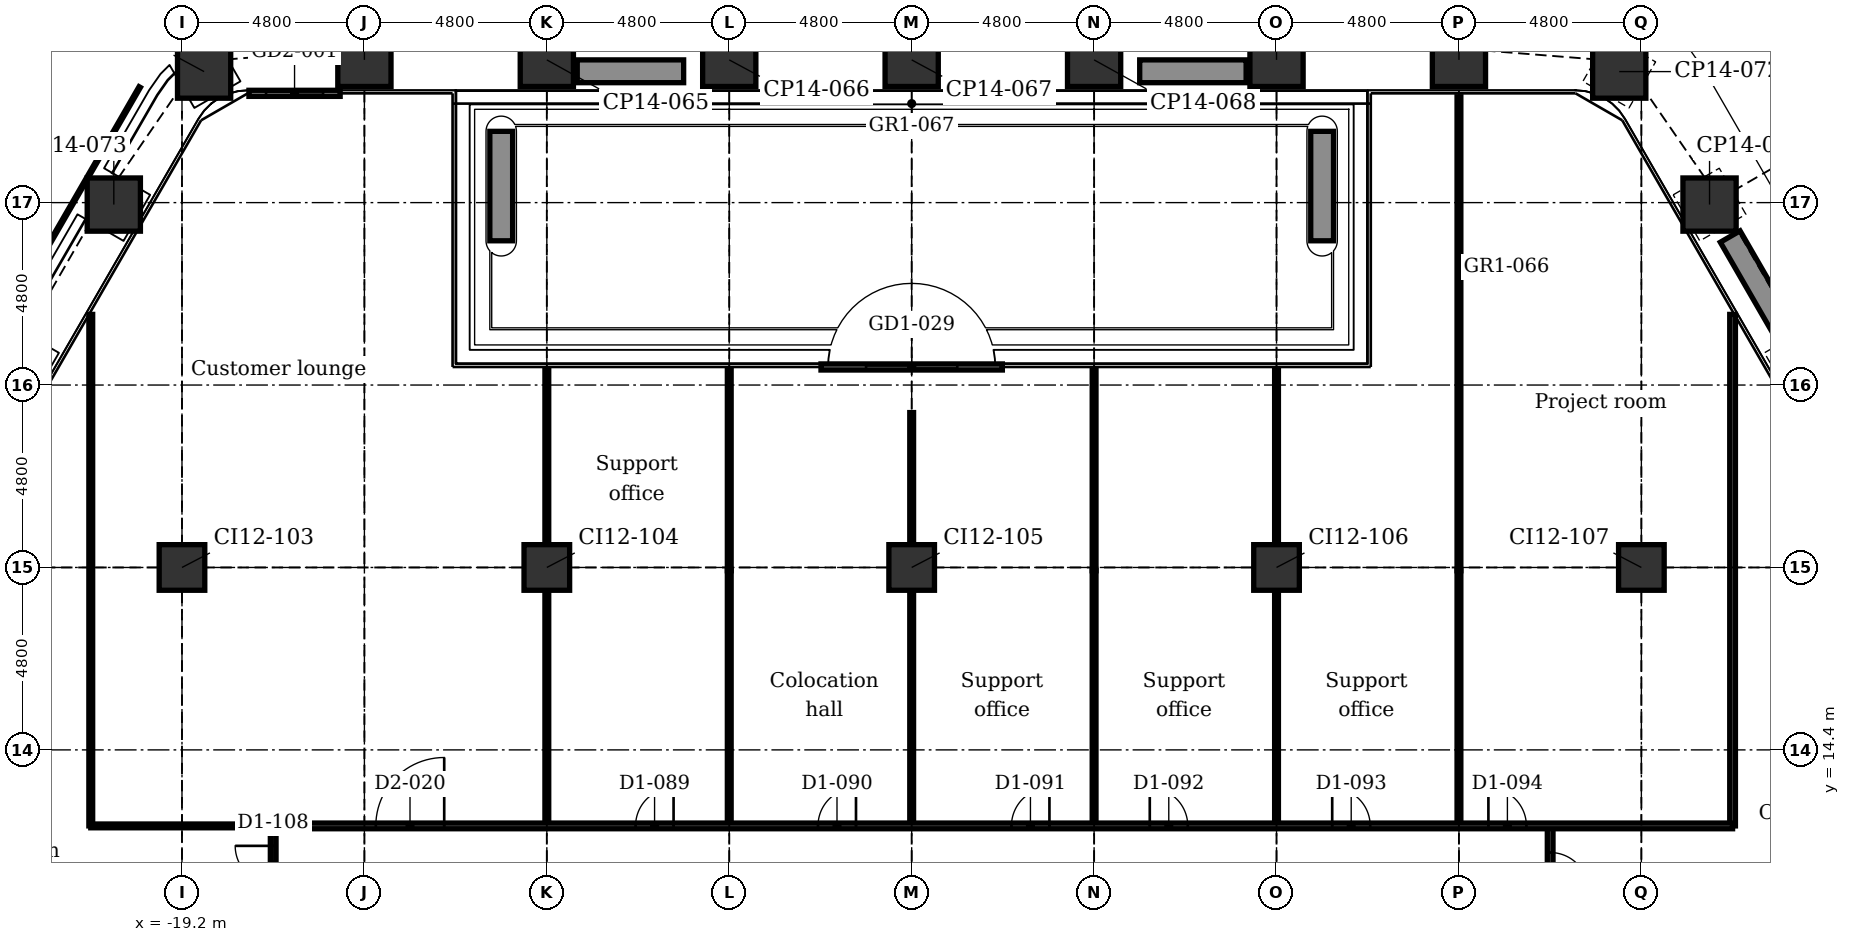
"""IFC4 building model, lengths in metres.
Left out: names, types, materials, properties, quantities, classifications, styles, units other than length and angle.
Written with IfcOpenShell. Run it as: python <this file> out.ifc"""

import sys

from ifc_helpers import new_model, si_unit, direction, frame, frame_2d, origin, origin_2d, place, context, subcontext, project, spatial, rectangle, extrude, element, fill, save


model = new_model("IFC4")
c1 = context("Model", 3, precision=1e-05, world=origin(), true_north=direction((0.0, 1.0)))
c2 = subcontext(c1, "Body", "Model", "MODEL_VIEW")
j1 = project(units=[si_unit("LENGTHUNIT", "METRE"), si_unit("PLANEANGLEUNIT", "RADIAN")], contexts=[c1])
p1 = place(None, origin())
s1 = spatial("IfcSite", under=j1, at=p1, CompositionType="ELEMENT")
p2 = place(p1, origin())
s2 = spatial("IfcBuilding", under=s1, at=p2, CompositionType="ELEMENT")
p3 = place(p2, frame((0.0, 0.0, 38.9)))
s3 = spatial("IfcBuildingStorey", under=s2, at=p3, CompositionType="ELEMENT", Elevation=38.9)
for number, where, z_axis, x_axis in (
    (1, (-18.618, 32.247, -0.25), (0.0, 0.0, 1.0), (0.866, 0.5, 0.0)),
    (2, (-14.4, 32.555, -0.25), (0.0, 0.0, 1.0), (1.0, 0.0, 0.0)),
    (3, (-9.6, 32.555, -0.25), (0.0, 0.0, 1.0), (1.0, 0.0, 0.0)),
    (4, (-4.8, 32.555, -0.25), (0.0, 0.0, 1.0), (1.0, 0.0, 0.0)),
    (5, (0.0, 32.555, -0.25), (0.0, 0.0, 1.0), (1.0, 0.0, 0.0)),
    (6, (4.8, 32.555, -0.25), (0.0, 0.0, 1.0), (1.0, 0.0, 0.0)),
    (7, (9.6, 32.555, -0.25), (0.0, 0.0, 1.0), (1.0, 0.0, 0.0)),
    (8, (14.4, 32.555, -0.25), (0.0, 0.0, 1.0), (1.0, 0.0, 0.0)),
    (9, (18.618, 32.247, -0.25), (0.0, 0.0, 1.0), (0.5, 0.866, 0.0)),
    (10, (20.994, 28.749, -0.25), (0.0, 0.0, 1.0), (0.866, 0.5, 0.0)),
    (11, (23.394, 24.592, -0.25), (0.0, 0.0, 1.0), (0.866, 0.5, 0.0)),
    (12, (-23.394, 24.592, -0.25), (0.0, 0.0, 1.0), (0.5, 0.866, 0.0)),
    (13, (-20.994, 28.749, -0.25), (0.0, 0.0, 1.0), (0.5, 0.866, 0.0)),
):
    element("IfcColumn", number, at=place(p3, frame(where, z_axis=z_axis, x_axis=x_axis)), inside=s3, PredefinedType="COLUMN", context=c2, shape_type="SweptSolid", body=[
        extrude(rectangle(XDim=1.4, YDim=1.4, at=origin_2d()), origin(), (0.0, 0.0, 1.0), 5.5),
    ])
for number, where, z_axis, x_axis in (
    (14, (-19.2, 19.2, -0.25), (0.0, 0.0, 1.0), (1.0, 0.0, 0.0)),
    (15, (-9.6, 19.2, -0.25), (0.0, 0.0, 1.0), (1.0, 0.0, 0.0)),
    (16, (0.0, 19.2, -0.25), (0.0, 0.0, 1.0), (1.0, 0.0, 0.0)),
    (17, (9.6, 19.2, -0.25), (0.0, 0.0, 1.0), (1.0, 0.0, 0.0)),
    (18, (19.2, 19.2, -0.25), (0.0, 0.0, 1.0), (1.0, 0.0, 0.0)),
):
    element("IfcColumn", number, at=place(p3, frame(where, z_axis=z_axis, x_axis=x_axis)), inside=s3, PredefinedType="COLUMN", context=c2, shape_type="SweptSolid", body=[
        extrude(rectangle(XDim=1.2, YDim=1.2, at=origin_2d()), origin(), (0.0, 0.0, 1.0), 5.5),
    ])
p4 = place(p3, frame((-17.438, 31.675, 0.0), z_axis=(0.0, 0.0, 1.0), x_axis=(1.0, 0.0, 0.0)))
e19 = element("IfcWall", 19, at=p4, inside=s3, PredefinedType="PARTITIONING", context=c2, shape_type="SweptSolid", body=[
    extrude(rectangle(XDim=2.4, YDim=0.16, at=frame_2d((1.2, 0.0))), origin(), (0.0, 0.0, 1.0), 5.25),
])
p5 = place(p4, frame((0.45, 0.0, 0.0)))
e20 = element("IfcOpeningElement", 20, at=p5, cuts=e19, PredefinedType="OPENING", context=c2, shape_type="SweptSolid", body=[
    extrude(rectangle(XDim=1.5, YDim=2.4, at=frame_2d((0.75, 1.2))), frame((0.0, 0.09, 0.0), z_axis=(0.0, -1.0, 0.0), x_axis=(1.0, 0.0, 0.0)), (0.0, 0.0, 1.0), 0.18),
])
p6 = place(p3, frame((-2.386, 24.475, 0.0), z_axis=(0.0, 0.0, 1.0), x_axis=(1.0, 0.0, 0.0)))
e21 = element("IfcWall", 21, at=p6, inside=s3, PredefinedType="PARTITIONING", context=c2, shape_type="SweptSolid", body=[
    extrude(rectangle(XDim=4.772, YDim=0.16, at=frame_2d((2.386, 0.0))), origin(), (0.0, 0.0, 1.0), 5.25),
])
p7 = place(p6, frame((1.186, 0.0, 0.0)))
e22 = element("IfcOpeningElement", 22, at=p7, cuts=e21, PredefinedType="OPENING", context=c2, shape_type="SweptSolid", body=[
    extrude(rectangle(XDim=2.4, YDim=2.4, at=frame_2d((1.2, 1.2))), frame((0.0, 0.09, 0.0), z_axis=(0.0, -1.0, 0.0), x_axis=(1.0, 0.0, 0.0)), (0.0, 0.0, 1.0), 0.18),
])
p8 = place(p3, frame((21.537, 27.907, 0.0), z_axis=(0.0, 0.0, 1.0), x_axis=(0.49998411664, -0.866034573852, 0.0)))
e23 = element("IfcWall", 23, at=p8, inside=s3, PredefinedType="USERDEFINED", context=c2, shape_type="SweptSolid", body=[
    extrude(rectangle(XDim=2.8, YDim=0.6, at=frame_2d((1.4, 0.0))), origin(), (0.0, 0.0, 1.0), 0.7),
])
for number, where, z_axis, x_axis in (
    (24, (-10.8, 27.795, 0.0), (0.0, 0.0, 1.0), (0.0, 1.0, 0.0)),
    (25, (10.8, 27.795, 0.0), (0.0, 0.0, 1.0), (0.0, 1.0, 0.0)),
):
    element("IfcWall", number, at=place(p3, frame(where, z_axis=z_axis, x_axis=x_axis)), inside=s3, PredefinedType="USERDEFINED", context=c2, shape_type="SweptSolid", body=[
        extrude(rectangle(XDim=2.88, YDim=0.6, at=frame_2d((1.44, 0.0))), origin(), (0.0, 0.0, 1.0), 0.7),
    ])
for number, where, z_axis, x_axis in (
    (26, (-6.0, 32.255, 0.0), (0.0, 0.0, 1.0), (-1.0, 0.0, 0.0)),
    (27, (6.0, 32.255, 0.0), (0.0, 0.0, 1.0), (1.0, 0.0, 0.0)),
):
    element("IfcWall", number, at=place(p3, frame(where, z_axis=z_axis, x_axis=x_axis)), inside=s3, PredefinedType="USERDEFINED", context=c2, shape_type="SweptSolid", body=[
        extrude(rectangle(XDim=2.8, YDim=0.6, at=frame_2d((1.4, 0.0))), origin(), (0.0, 0.0, 1.0), 0.7),
    ])
p9 = place(p3, frame((21.6, 12.4, 0.0), z_axis=(0.0, 0.0, 1.0), x_axis=(0.0, 1.0, 0.0)))
e28 = element("IfcWall", 28, at=p9, inside=s3, PredefinedType="PARTITIONING", context=c2, shape_type="SweptSolid", body=[
    extrude(rectangle(XDim=13.458, YDim=0.15, at=frame_2d((6.729, 0.0))), origin(), (0.0, 0.0, 1.0), 5.25),
])
p10 = place(p3, frame((16.8, 3.95, 0.0), z_axis=(0.0, 0.0, 1.0), x_axis=(0.0, 1.0, 0.0)))
e29 = element("IfcWall", 29, at=p10, inside=s3, PredefinedType="PARTITIONING", context=c2, shape_type="SweptSolid", body=[
    extrude(rectangle(XDim=8.45, YDim=0.15, at=frame_2d((4.225, 0.0))), origin(), (0.0, 0.0, 1.0), 5.25),
])
p11 = place(p10, frame((2.25, 0.0, 0.0)))
e30 = element("IfcOpeningElement", 30, at=p11, cuts=e29, PredefinedType="OPENING", context=c2, shape_type="SweptSolid", body=[
    extrude(rectangle(XDim=1.0, YDim=2.1, at=frame_2d((0.5, 1.05))), frame((0.0, 0.085, 0.0), z_axis=(0.0, -1.0, 0.0), x_axis=(1.0, 0.0, 0.0)), (0.0, 0.0, 1.0), 0.17),
])
p12 = place(p10, frame((6.75, 0.0, 0.0)))
e31 = element("IfcOpeningElement", 31, at=p12, cuts=e29, PredefinedType="OPENING", context=c2, shape_type="SweptSolid", body=[
    extrude(rectangle(XDim=1.0, YDim=2.1, at=frame_2d((0.5, 1.05))), frame((0.0, 0.085, 0.0), z_axis=(0.0, -1.0, 0.0), x_axis=(1.0, 0.0, 0.0)), (0.0, 0.0, 1.0), 0.17),
])
p13 = place(p3, frame((14.4, 19.113, 0.0), z_axis=(0.0, 0.0, 1.0), x_axis=(0.0, 1.0, 0.0)))
e32 = element("IfcWall", 32, at=p13, inside=s3, PredefinedType="PARTITIONING", context=c2, shape_type="SweptSolid", body=[
    extrude(rectangle(XDim=12.472, YDim=0.1, at=frame_2d((6.236, 0.0))), origin(), (0.0, 0.0, 1.0), 4.566),
])
p14 = place(p3, frame((14.4, 12.4, 0.0), z_axis=(0.0, 0.0, 1.0), x_axis=(0.0, 1.0, 0.0)))
e33 = element("IfcWall", 33, at=p14, inside=s3, PredefinedType="PARTITIONING", context=c2, shape_type="SweptSolid", body=[
    extrude(rectangle(XDim=6.713, YDim=0.1, at=frame_2d((3.356, 0.0))), origin(), (0.0, 0.0, 1.0), 4.793),
])
p15 = place(p3, frame((9.6, 12.4, 0.0), z_axis=(0.0, 0.0, 1.0), x_axis=(0.0, 1.0, 0.0)))
e34 = element("IfcWall", 34, at=p15, inside=s3, PredefinedType="PARTITIONING", context=c2, shape_type="SweptSolid", body=[
    extrude(rectangle(XDim=6.2, YDim=0.1, at=frame_2d((3.1, 0.0))), origin(), (0.0, 0.0, 1.0), 4.793),
])
p16 = place(p3, frame((9.6, 19.8, 0.0), z_axis=(0.0, 0.0, 1.0), x_axis=(0.0, 1.0, 0.0)))
e35 = element("IfcWall", 35, at=p16, inside=s3, PredefinedType="PARTITIONING", context=c2, shape_type="SweptSolid", body=[
    extrude(rectangle(XDim=4.585, YDim=0.1, at=frame_2d((2.293, 0.0))), origin(), (0.0, 0.0, 1.0), 4.642),
])
p17 = place(p3, frame((4.8, 12.4, 0.0), z_axis=(0.0, 0.0, 1.0), x_axis=(0.0, 1.0, 0.0)))
e36 = element("IfcWall", 36, at=p17, inside=s3, PredefinedType="PARTITIONING", context=c2, shape_type="SweptSolid", body=[
    extrude(rectangle(XDim=6.713, YDim=0.1, at=frame_2d((3.356, 0.0))), origin(), (0.0, 0.0, 1.0), 4.793),
])
p18 = place(p3, frame((4.8, 19.113, 0.0), z_axis=(0.0, 0.0, 1.0), x_axis=(0.0, 1.0, 0.0)))
e37 = element("IfcWall", 37, at=p18, inside=s3, PredefinedType="PARTITIONING", context=c2, shape_type="SweptSolid", body=[
    extrude(rectangle(XDim=5.272, YDim=0.1, at=frame_2d((2.636, 0.0))), origin(), (0.0, 0.0, 1.0), 4.566),
])
p19 = place(p3, frame((0.0, 12.4, 0.0), z_axis=(0.0, 0.0, 1.0), x_axis=(0.0, 1.0, 0.0)))
e38 = element("IfcWall", 38, at=p19, inside=s3, PredefinedType="PARTITIONING", context=c2, shape_type="SweptSolid", body=[
    extrude(rectangle(XDim=6.2, YDim=0.1, at=frame_2d((3.1, 0.0))), origin(), (0.0, 0.0, 1.0), 4.793),
])
p20 = place(p3, frame((0.0, 19.8, 0.0), z_axis=(0.0, 0.0, 1.0), x_axis=(0.0, 1.0, 0.0)))
e39 = element("IfcWall", 39, at=p20, inside=s3, PredefinedType="PARTITIONING", context=c2, shape_type="SweptSolid", body=[
    extrude(rectangle(XDim=3.475, YDim=0.1, at=frame_2d((1.738, 0.0))), origin(), (0.0, 0.0, 1.0), 4.642),
])
p21 = place(p3, frame((-4.8, 12.4, 0.0), z_axis=(0.0, 0.0, 1.0), x_axis=(0.0, 1.0, 0.0)))
e40 = element("IfcWall", 40, at=p21, inside=s3, PredefinedType="PARTITIONING", context=c2, shape_type="SweptSolid", body=[
    extrude(rectangle(XDim=6.713, YDim=0.1, at=frame_2d((3.356, 0.0))), origin(), (0.0, 0.0, 1.0), 4.793),
])
p22 = place(p3, frame((-4.8, 19.113, 0.0), z_axis=(0.0, 0.0, 1.0), x_axis=(0.0, 1.0, 0.0)))
e41 = element("IfcWall", 41, at=p22, inside=s3, PredefinedType="PARTITIONING", context=c2, shape_type="SweptSolid", body=[
    extrude(rectangle(XDim=5.272, YDim=0.1, at=frame_2d((2.636, 0.0))), origin(), (0.0, 0.0, 1.0), 4.566),
])
p23 = place(p3, frame((-9.6, 12.4, 0.0), z_axis=(0.0, 0.0, 1.0), x_axis=(0.0, 1.0, 0.0)))
e42 = element("IfcWall", 42, at=p23, inside=s3, PredefinedType="PARTITIONING", context=c2, shape_type="SweptSolid", body=[
    extrude(rectangle(XDim=6.2, YDim=0.1, at=frame_2d((3.1, 0.0))), origin(), (0.0, 0.0, 1.0), 4.793),
])
p24 = place(p3, frame((-9.6, 19.8, 0.0), z_axis=(0.0, 0.0, 1.0), x_axis=(0.0, 1.0, 0.0)))
e43 = element("IfcWall", 43, at=p24, inside=s3, PredefinedType="PARTITIONING", context=c2, shape_type="SweptSolid", body=[
    extrude(rectangle(XDim=4.585, YDim=0.1, at=frame_2d((2.293, 0.0))), origin(), (0.0, 0.0, 1.0), 4.642),
])
p25 = place(p3, frame((-16.8, 3.95, 0.0), z_axis=(0.0, 0.0, 1.0), x_axis=(0.0, 1.0, 0.0)))
e44 = element("IfcWall", 44, at=p25, inside=s3, PredefinedType="PARTITIONING", context=c2, shape_type="SweptSolid", body=[
    extrude(rectangle(XDim=8.45, YDim=0.15, at=frame_2d((4.225, 0.0))), origin(), (0.0, 0.0, 1.0), 5.25),
])
p26 = place(p25, frame((0.95, 0.0, 0.0)))
e45 = element("IfcOpeningElement", 45, at=p26, cuts=e44, PredefinedType="OPENING", context=c2, shape_type="SweptSolid", body=[
    extrude(rectangle(XDim=1.0, YDim=2.1, at=frame_2d((0.5, 1.05))), frame((0.0, 0.085, 0.0), z_axis=(0.0, -1.0, 0.0), x_axis=(1.0, 0.0, 0.0)), (0.0, 0.0, 1.0), 0.17),
])
p27 = place(p25, frame((3.85, 0.0, 0.0)))
e46 = element("IfcOpeningElement", 46, at=p27, cuts=e44, PredefinedType="OPENING", context=c2, shape_type="SweptSolid", body=[
    extrude(rectangle(XDim=1.0, YDim=2.1, at=frame_2d((0.5, 1.05))), frame((0.0, 0.085, 0.0), z_axis=(0.0, -1.0, 0.0), x_axis=(1.0, 0.0, 0.0)), (0.0, 0.0, 1.0), 0.17),
])
p28 = place(p25, frame((6.925, 0.0, 0.0)))
e47 = element("IfcOpeningElement", 47, at=p28, cuts=e44, PredefinedType="OPENING", context=c2, shape_type="SweptSolid", body=[
    extrude(rectangle(XDim=1.0, YDim=2.1, at=frame_2d((0.5, 1.05))), frame((0.0, 0.085, 0.0), z_axis=(0.0, -1.0, 0.0), x_axis=(1.0, 0.0, 0.0)), (0.0, 0.0, 1.0), 0.17),
])
p29 = place(p3, frame((-21.6, 12.4, 0.0), z_axis=(0.0, 0.0, 1.0), x_axis=(0.0, 1.0, 0.0)))
e48 = element("IfcWall", 48, at=p29, inside=s3, PredefinedType="PARTITIONING", context=c2, shape_type="SweptSolid", body=[
    extrude(rectangle(XDim=13.458, YDim=0.1, at=frame_2d((6.729, 0.0))), origin(), (0.0, 0.0, 1.0), 5.25),
])
p30 = place(p3, frame((-21.6, 12.4, 0.0), z_axis=(0.0, 0.0, 1.0), x_axis=(1.0, 0.0, 0.0)))
e49 = element("IfcWall", 49, at=p30, inside=s3, PredefinedType="PARTITIONING", context=c2, shape_type="SweptSolid", body=[
    extrude(rectangle(XDim=4.8, YDim=0.1, at=frame_2d((2.4, 0.0))), origin(), (0.0, 0.0, 1.0), 5.25),
])
p31 = place(p3, frame((-16.8, 12.4, 0.0), z_axis=(0.0, 0.0, 1.0), x_axis=(1.0, 0.0, 0.0)))
e50 = element("IfcWall", 50, at=p31, inside=s3, PredefinedType="PARTITIONING", context=c2, shape_type="SweptSolid", body=[
    extrude(rectangle(XDim=38.4, YDim=0.15, at=frame_2d((19.2, 0.0))), origin(), (0.0, 0.0, 1.0), 5.25),
])
p32 = place(p31, frame((2.7, 0.0, 0.0)))
e51 = element("IfcOpeningElement", 51, at=p32, cuts=e50, PredefinedType="OPENING", context=c2, shape_type="SweptSolid", body=[
    extrude(rectangle(XDim=1.8, YDim=2.1, at=frame_2d((0.9, 1.05))), frame((0.0, 0.085, 0.0), z_axis=(0.0, -1.0, 0.0), x_axis=(1.0, 0.0, 0.0)), (0.0, 0.0, 1.0), 0.17),
])
p33 = place(p31, frame((9.535, 0.0, 0.0)))
e52 = element("IfcOpeningElement", 52, at=p33, cuts=e50, PredefinedType="OPENING", context=c2, shape_type="SweptSolid", body=[
    extrude(rectangle(XDim=1.0, YDim=2.1, at=frame_2d((0.5, 1.05))), frame((0.0, 0.085, 0.0), z_axis=(0.0, -1.0, 0.0), x_axis=(1.0, 0.0, 0.0)), (0.0, 0.0, 1.0), 0.17),
])
p34 = place(p31, frame((14.335, 0.0, 0.0)))
e53 = element("IfcOpeningElement", 53, at=p34, cuts=e50, PredefinedType="OPENING", context=c2, shape_type="SweptSolid", body=[
    extrude(rectangle(XDim=1.0, YDim=2.1, at=frame_2d((0.5, 1.05))), frame((0.0, 0.085, 0.0), z_axis=(0.0, -1.0, 0.0), x_axis=(1.0, 0.0, 0.0)), (0.0, 0.0, 1.0), 0.17),
])
p35 = place(p31, frame((19.425, 0.0, 0.0)))
e54 = element("IfcOpeningElement", 54, at=p35, cuts=e50, PredefinedType="OPENING", context=c2, shape_type="SweptSolid", body=[
    extrude(rectangle(XDim=1.0, YDim=2.1, at=frame_2d((0.5, 1.05))), frame((0.0, 0.085, 0.0), z_axis=(0.0, -1.0, 0.0), x_axis=(1.0, 0.0, 0.0)), (0.0, 0.0, 1.0), 0.17),
])
p36 = place(p31, frame((23.065, 0.0, 0.0)))
e55 = element("IfcOpeningElement", 55, at=p36, cuts=e50, PredefinedType="OPENING", context=c2, shape_type="SweptSolid", body=[
    extrude(rectangle(XDim=1.0, YDim=2.1, at=frame_2d((0.5, 1.05))), frame((0.0, 0.085, 0.0), z_axis=(0.0, -1.0, 0.0), x_axis=(1.0, 0.0, 0.0)), (0.0, 0.0, 1.0), 0.17),
])
p37 = place(p31, frame((27.865, 0.0, 0.0)))
e56 = element("IfcOpeningElement", 56, at=p37, cuts=e50, PredefinedType="OPENING", context=c2, shape_type="SweptSolid", body=[
    extrude(rectangle(XDim=1.0, YDim=2.1, at=frame_2d((0.5, 1.05))), frame((0.0, 0.085, 0.0), z_axis=(0.0, -1.0, 0.0), x_axis=(1.0, 0.0, 0.0)), (0.0, 0.0, 1.0), 0.17),
])
p38 = place(p31, frame((31.975, 0.0, 0.0)))
e57 = element("IfcOpeningElement", 57, at=p38, cuts=e50, PredefinedType="OPENING", context=c2, shape_type="SweptSolid", body=[
    extrude(rectangle(XDim=1.0, YDim=2.1, at=frame_2d((0.5, 1.05))), frame((0.0, 0.085, 0.0), z_axis=(0.0, -1.0, 0.0), x_axis=(1.0, 0.0, 0.0)), (0.0, 0.0, 1.0), 0.17),
])
p39 = place(p5, origin())
e58 = element("IfcDoor", 58, at=p39, inside=s3, OperationType="DOUBLE_DOOR_SLIDING", PredefinedType="DOOR", context=c2, shape_type="SweptSolid", body=[
    extrude(rectangle(XDim=1.5, YDim=2.4, at=frame_2d((0.75, 1.2))), frame((0.0, 0.025, 0.0), z_axis=(0.0, -1.0, 0.0), x_axis=(1.0, 0.0, 0.0)), (0.0, 0.0, 1.0), 0.05),
])
fill(e20, e58)
p40 = place(p7, origin())
e59 = element("IfcDoor", 59, at=p40, inside=s3, OperationType="DOUBLE_DOOR_SLIDING", PredefinedType="DOOR", context=c2, shape_type="SweptSolid", body=[
    extrude(rectangle(XDim=2.4, YDim=2.4, at=frame_2d((1.2, 1.2))), frame((0.0, 0.025, 0.0), z_axis=(0.0, -1.0, 0.0), x_axis=(1.0, 0.0, 0.0)), (0.0, 0.0, 1.0), 0.05),
])
fill(e22, e59)
p41 = place(p32, origin())
e60 = element("IfcDoor", 60, at=p41, inside=s3, OperationType="SINGLE_SWING_RIGHT", PredefinedType="DOOR", context=c2, shape_type="SweptSolid", body=[
    extrude(rectangle(XDim=1.8, YDim=2.1, at=frame_2d((0.9, 1.05))), frame((0.0, 0.025, 0.0), z_axis=(0.0, -1.0, 0.0), x_axis=(1.0, 0.0, 0.0)), (0.0, 0.0, 1.0), 0.05),
])
fill(e51, e60)
p42 = place(p33, origin())
e61 = element("IfcDoor", 61, at=p42, inside=s3, OperationType="SINGLE_SWING_RIGHT", PredefinedType="DOOR", context=c2, shape_type="SweptSolid", body=[
    extrude(rectangle(XDim=1.0, YDim=2.1, at=frame_2d((0.5, 1.05))), frame((0.0, 0.025, 0.0), z_axis=(0.0, -1.0, 0.0), x_axis=(1.0, 0.0, 0.0)), (0.0, 0.0, 1.0), 0.05),
])
fill(e52, e61)
p43 = place(p34, origin())
e62 = element("IfcDoor", 62, at=p43, inside=s3, OperationType="SINGLE_SWING_RIGHT", PredefinedType="DOOR", context=c2, shape_type="SweptSolid", body=[
    extrude(rectangle(XDim=1.0, YDim=2.1, at=frame_2d((0.5, 1.05))), frame((0.0, 0.025, 0.0), z_axis=(0.0, -1.0, 0.0), x_axis=(1.0, 0.0, 0.0)), (0.0, 0.0, 1.0), 0.05),
])
fill(e53, e62)
p44 = place(p35, origin())
e63 = element("IfcDoor", 63, at=p44, inside=s3, OperationType="SINGLE_SWING_RIGHT", PredefinedType="DOOR", context=c2, shape_type="SweptSolid", body=[
    extrude(rectangle(XDim=1.0, YDim=2.1, at=frame_2d((0.5, 1.05))), frame((0.0, 0.025, 0.0), z_axis=(0.0, -1.0, 0.0), x_axis=(1.0, 0.0, 0.0)), (0.0, 0.0, 1.0), 0.05),
])
fill(e54, e63)
p45 = place(p36, origin())
e64 = element("IfcDoor", 64, at=p45, inside=s3, OperationType="SINGLE_SWING_LEFT", PredefinedType="DOOR", context=c2, shape_type="SweptSolid", body=[
    extrude(rectangle(XDim=1.0, YDim=2.1, at=frame_2d((0.5, 1.05))), frame((0.0, 0.025, 0.0), z_axis=(0.0, -1.0, 0.0), x_axis=(1.0, 0.0, 0.0)), (0.0, 0.0, 1.0), 0.05),
])
fill(e55, e64)
p46 = place(p37, origin())
e65 = element("IfcDoor", 65, at=p46, inside=s3, OperationType="SINGLE_SWING_LEFT", PredefinedType="DOOR", context=c2, shape_type="SweptSolid", body=[
    extrude(rectangle(XDim=1.0, YDim=2.1, at=frame_2d((0.5, 1.05))), frame((0.0, 0.025, 0.0), z_axis=(0.0, -1.0, 0.0), x_axis=(1.0, 0.0, 0.0)), (0.0, 0.0, 1.0), 0.05),
])
fill(e56, e65)
p47 = place(p38, origin())
e66 = element("IfcDoor", 66, at=p47, inside=s3, OperationType="SINGLE_SWING_LEFT", PredefinedType="DOOR", context=c2, shape_type="SweptSolid", body=[
    extrude(rectangle(XDim=1.0, YDim=2.1, at=frame_2d((0.5, 1.05))), frame((0.0, 0.025, 0.0), z_axis=(0.0, -1.0, 0.0), x_axis=(1.0, 0.0, 0.0)), (0.0, 0.0, 1.0), 0.05),
])
fill(e57, e66)
p48 = place(p12, frame((1.0, 0.0, 0.0), z_axis=(0.0, 0.0, 1.0), x_axis=(-1.0, 0.0, 0.0)))
e67 = element("IfcDoor", 67, at=p48, inside=s3, OperationType="SINGLE_SWING_LEFT", PredefinedType="DOOR", context=c2, shape_type="SweptSolid", body=[
    extrude(rectangle(XDim=1.0, YDim=2.1, at=frame_2d((0.5, 1.05))), frame((0.0, 0.025, 0.0), z_axis=(0.0, -1.0, 0.0), x_axis=(1.0, 0.0, 0.0)), (0.0, 0.0, 1.0), 0.05),
])
fill(e31, e67)
p49 = place(p28, origin())
e68 = element("IfcDoor", 68, at=p49, inside=s3, OperationType="SINGLE_SWING_RIGHT", PredefinedType="DOOR", context=c2, shape_type="SweptSolid", body=[
    extrude(rectangle(XDim=1.0, YDim=2.1, at=frame_2d((0.5, 1.05))), frame((0.0, 0.025, 0.0), z_axis=(0.0, -1.0, 0.0), x_axis=(1.0, 0.0, 0.0)), (0.0, 0.0, 1.0), 0.05),
])
fill(e47, e68)
save(model, sys.argv[1])
